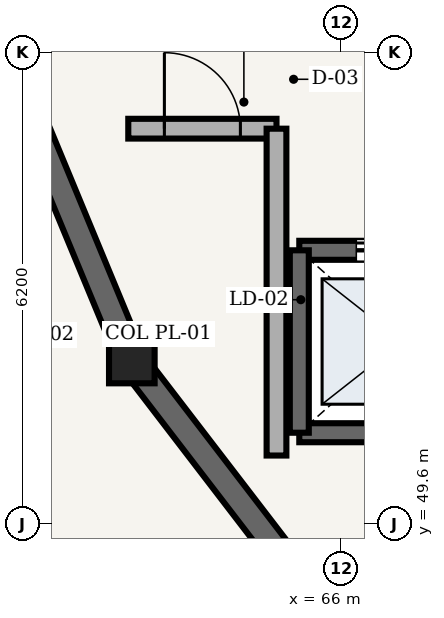
"""IFC4 building model, lengths in metres.
Left out: names, types, materials, properties, quantities, classifications, styles, units other than length and angle.
Written with IfcOpenShell. Run it as: python <this file> out.ifc"""

import sys

from ifc_helpers import new_model, si_unit, direction, frame, frame_2d, origin, origin_2d, place, context, subcontext, project, spatial, rectangle, extrude, element, fill, save


model = new_model("IFC4")
c1 = context("Model", 3, precision=1e-05, world=origin(), true_north=direction((0.0, 1.0)))
c2 = subcontext(c1, "Body", "Model", "MODEL_VIEW")
j1 = project(units=[si_unit("LENGTHUNIT", "METRE"), si_unit("PLANEANGLEUNIT", "RADIAN")], contexts=[c1])
p1 = place(None, origin())
s1 = spatial("IfcSite", under=j1, at=p1, CompositionType="ELEMENT")
p2 = place(p1, origin())
s2 = spatial("IfcBuilding", under=s1, at=p2, CompositionType="ELEMENT")
p3 = place(p2, origin())
s3 = spatial("IfcBuildingStorey", under=s2, at=p3, CompositionType="ELEMENT", Elevation=0.0)
p4 = place(p3, frame((61.198, 56.694, 0.0), z_axis=(0.0, 0.0, 1.0), x_axis=(0.382713071139, -0.923867255172, 0.0)))
e1 = element("IfcWall", 1, at=p4, inside=s3, PredefinedType="SHEAR", context=c2, shape_type="SweptSolid", body=[
    extrude(rectangle(XDim=5.352, YDim=0.35, at=frame_2d((2.676, 0.0))), origin(), (0.0, 0.0, 1.0), 5.15),
])
p5 = place(p3, frame((63.247, 51.75, 0.0), z_axis=(0.0, 0.0, 1.0), x_axis=(1.0, 0.0, 0.0)))
e2 = element("IfcColumn", 2, at=p5, inside=s3, PredefinedType="PILASTER", context=c2, shape_type="SweptSolid", body=[
    extrude(rectangle(XDim=0.6, YDim=0.6, at=origin_2d()), origin(), (0.0, 0.0, 1.0), 5.4),
])
p6 = place(p3, frame((63.247, 51.75, 0.0), z_axis=(0.0, 0.0, 1.0), x_axis=(0.60876670321, -0.793349293227, 0.0)))
e3 = element("IfcWall", 3, at=p6, inside=s3, PredefinedType="SHEAR", context=c2, shape_type="SweptSolid", body=[
    extrude(rectangle(XDim=5.352, YDim=0.35, at=frame_2d((2.676, 0.0))), origin(), (0.0, 0.0, 1.0), 5.15),
])
p7 = place(p3, frame((65.45, 50.8, 0.0), z_axis=(0.0, 0.0, 1.0), x_axis=(1.0, 0.0, 0.0)))
e4 = element("IfcWall", 4, at=p7, inside=s3, PredefinedType="SHEAR", context=c2, shape_type="SweptSolid", body=[
    extrude(rectangle(XDim=2.7, YDim=0.25, at=frame_2d((1.35, 0.0))), origin(), (0.0, 0.0, 1.0), 5.15),
])
p8 = place(p3, frame((68.15, 53.2, 0.0), z_axis=(0.0, 0.0, 1.0), x_axis=(-1.0, 0.0, 0.0)))
e5 = element("IfcWall", 5, at=p8, inside=s3, PredefinedType="SHEAR", context=c2, shape_type="SweptSolid", body=[
    extrude(rectangle(XDim=2.7, YDim=0.25, at=frame_2d((1.35, 0.0))), origin(), (0.0, 0.0, 1.0), 5.15),
])
p9 = place(p8, frame((0.75, 0.0, 0.0)))
e6 = element("IfcOpeningElement", 6, at=p9, cuts=e5, PredefinedType="OPENING", context=c2, shape_type="SweptSolid", body=[
    extrude(rectangle(XDim=1.2, YDim=2.2, at=frame_2d((0.6, 1.1))), frame((0.0, 0.135, 0.0), z_axis=(0.0, -1.0, 0.0), x_axis=(1.0, 0.0, 0.0)), (0.0, 0.0, 1.0), 0.27),
])
p10 = place(p3, frame((65.45, 53.2, 0.0), z_axis=(0.0, 0.0, 1.0), x_axis=(0.0, -1.0, 0.0)))
e7 = element("IfcWall", 7, at=p10, inside=s3, PredefinedType="SHEAR", context=c2, shape_type="SweptSolid", body=[
    extrude(rectangle(XDim=2.4, YDim=0.25, at=frame_2d((1.2, 0.0))), origin(), (0.0, 0.0, 1.0), 5.15),
])
p11 = place(p3, frame((63.2, 54.8, 0.0), z_axis=(0.0, 0.0, 1.0), x_axis=(1.0, 0.0, 0.0)))
e8 = element("IfcWall", 8, at=p11, inside=s3, PredefinedType="PARTITIONING", context=c2, shape_type="SweptSolid", body=[
    extrude(rectangle(XDim=1.95, YDim=0.26, at=frame_2d((0.975, 0.0))), origin(), (0.0, 0.0, 1.0), 4.35),
])
p12 = place(p11, frame((0.475, 0.0, 0.0)))
e9 = element("IfcOpeningElement", 9, at=p12, cuts=e8, PredefinedType="OPENING", context=c2, shape_type="SweptSolid", body=[
    extrude(rectangle(XDim=1.0, YDim=2.1, at=frame_2d((0.5, 1.05))), frame((0.0, 0.14, 0.0), z_axis=(0.0, -1.0, 0.0), x_axis=(1.0, 0.0, 0.0)), (0.0, 0.0, 1.0), 0.28),
])
p13 = place(p3, frame((65.15, 54.8, 0.0), z_axis=(0.0, 0.0, 1.0), x_axis=(0.0, -1.0, 0.0)))
e10 = element("IfcWall", 10, at=p13, inside=s3, PredefinedType="PARTITIONING", context=c2, shape_type="SweptSolid", body=[
    extrude(rectangle(XDim=4.3, YDim=0.26, at=frame_2d((2.15, 0.0))), origin(), (0.0, 0.0, 1.0), 4.35),
])
p14 = place(p9, origin())
e11 = element("IfcDoor", 11, at=p14, inside=s3, OperationType="DOUBLE_DOOR_SLIDING", PredefinedType="DOOR", context=c2, shape_type="SweptSolid", body=[
    extrude(rectangle(XDim=1.2, YDim=2.2, at=frame_2d((0.6, 1.1))), frame((0.0, 0.025, 0.0), z_axis=(0.0, -1.0, 0.0), x_axis=(1.0, 0.0, 0.0)), (0.0, 0.0, 1.0), 0.05),
])
fill(e6, e11)
p15 = place(p12, origin())
e12 = element("IfcDoor", 12, at=p15, inside=s3, OperationType="SINGLE_SWING_LEFT", PredefinedType="DOOR", context=c2, shape_type="SweptSolid", body=[
    extrude(rectangle(XDim=1.0, YDim=2.1, at=frame_2d((0.5, 1.05))), frame((0.0, 0.025, 0.0), z_axis=(0.0, -1.0, 0.0), x_axis=(1.0, 0.0, 0.0)), (0.0, 0.0, 1.0), 0.05),
])
fill(e9, e12)
save(model, sys.argv[1])
